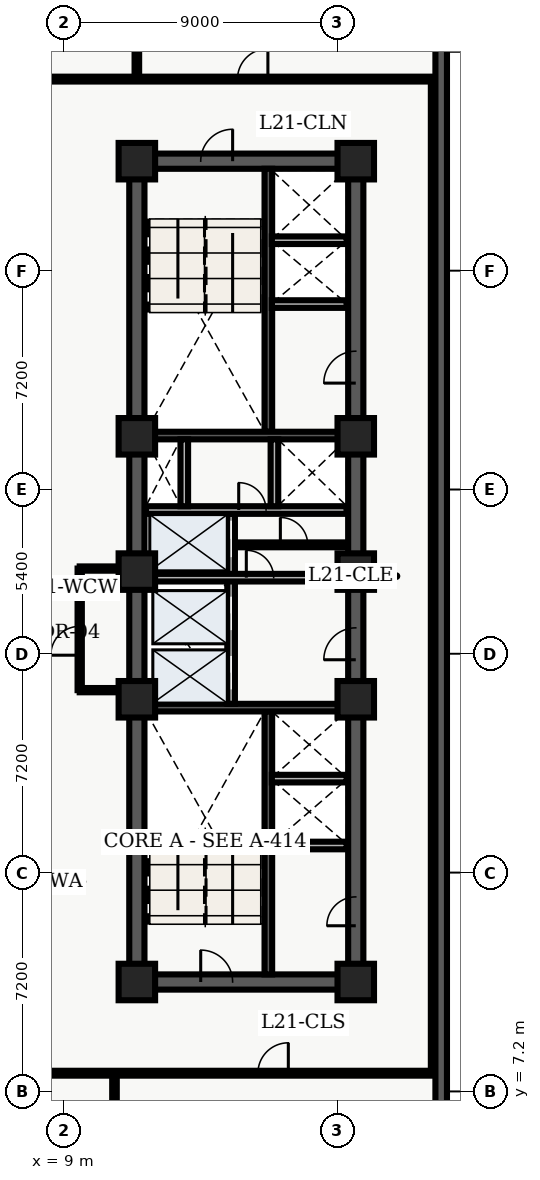
"""IFC4 building model, lengths in metres.
Left out: names, types, materials, properties, quantities, classifications, styles, units other than length and angle.
Written with IfcOpenShell. Run it as: python <this file> out.ifc"""

import sys

from ifc_helpers import new_model, entity, si_unit, converted_unit, direction, frame, origin_with_axes, origin_2d_with_axis, place, context, subcontext, project, spatial, polyline, rectangle, outline, extrude, element, fill, save


model = new_model("IFC4")
c1 = context("Model", 3, precision=1e-05, world=origin_with_axes(), true_north=direction((0.0, 1.0)))
c2 = subcontext(c1, "Body", "Model", "MODEL_VIEW")
j1 = project(units=[si_unit("LENGTHUNIT", "METRE"), converted_unit("PLANEANGLEUNIT", "DEGREE", entity("IfcPlaneAngleMeasure", 0.017), si_unit("PLANEANGLEUNIT", "RADIAN"), dimensions=[0, 0, 0, 0, 0, 0, 0])], contexts=[c1])
p1 = place(None, origin_with_axes())
s1 = spatial("IfcSite", under=j1, at=p1, CompositionType="ELEMENT")
p2 = place(p1, origin_with_axes())
s2 = spatial("IfcBuilding", under=s1, at=p2, CompositionType="ELEMENT")
p3 = place(p2, frame((0.0, 0.0, 89.1), z_axis=(0.0, 0.0, 1.0), x_axis=(1.0, 0.0, 0.0)))
s3 = spatial("IfcBuildingStorey", under=s2, at=p3, CompositionType="ELEMENT", Elevation=89.1)
p4 = place(p3, frame((11.4, 10.8, 0.0), z_axis=(0.0, 0.0, 1.0), x_axis=(0.0, 1.0, 0.0)))
e1 = element("IfcWall", 1, at=p4, inside=s3, PredefinedType="SHEAR", context=c2, shape_type="SweptSolid", body=[
    extrude(outline(polyline([(0.0, -0.25), (27.0, -0.25), (27.0, 0.25), (0.0, 0.25), (0.0, -0.25)])), origin_with_axes(), (0.0, 0.0, 1.0), 3.66),
])
p5 = place(p3, frame((11.4, 10.8, 0.0), z_axis=(0.0, 0.0, 1.0), x_axis=(1.0, 0.0, 0.0)))
e2 = element("IfcWall", 2, at=p5, inside=s3, PredefinedType="SHEAR", context=c2, shape_type="SweptSolid", body=[
    extrude(outline(polyline([(0.0, -0.25), (7.2, -0.25), (7.2, 0.25), (0.0, 0.25), (0.0, -0.25)])), origin_with_axes(), (0.0, 0.0, 1.0), 3.66),
])
p6 = place(p5, frame((2.625, 0.0, 0.0), z_axis=(0.0, 0.0, 1.0), x_axis=(1.0, 0.0, 0.0)))
e3 = element("IfcOpeningElement", 3, at=p6, cuts=e2, PredefinedType="OPENING", context=c2, shape_type="SweptSolid", body=[
    extrude(rectangle(XDim=1.05, YDim=0.52, at=origin_2d_with_axis()), origin_with_axes(), (0.0, 0.0, 1.0), 2.15),
])
p7 = place(p3, frame((11.4, 37.8, 0.0), z_axis=(0.0, 0.0, 1.0), x_axis=(1.0, 0.0, 0.0)))
e4 = element("IfcWall", 4, at=p7, inside=s3, PredefinedType="SHEAR", context=c2, shape_type="SweptSolid", body=[
    extrude(outline(polyline([(0.0, -0.25), (7.2, -0.25), (7.2, 0.25), (0.0, 0.25), (0.0, -0.25)])), origin_with_axes(), (0.0, 0.0, 1.0), 3.66),
])
p8 = place(p7, frame((2.625, 0.0, 0.0), z_axis=(0.0, 0.0, 1.0), x_axis=(1.0, 0.0, 0.0)))
e5 = element("IfcOpeningElement", 5, at=p8, cuts=e4, PredefinedType="OPENING", context=c2, shape_type="SweptSolid", body=[
    extrude(rectangle(XDim=1.05, YDim=0.52, at=origin_2d_with_axis()), origin_with_axes(), (0.0, 0.0, 1.0), 2.15),
])
p9 = place(p3, frame((18.6, 10.8, 0.0), z_axis=(0.0, 0.0, 1.0), x_axis=(0.0, 1.0, 0.0)))
e6 = element("IfcWall", 6, at=p9, inside=s3, PredefinedType="SHEAR", context=c2, shape_type="SweptSolid", body=[
    extrude(outline(polyline([(0.0, -0.25), (13.5, -0.25), (13.5, 0.25), (0.0, 0.25), (0.0, -0.25)])), origin_with_axes(), (0.0, 0.0, 1.0), 3.66),
])
p10 = place(p9, frame((11.125, 0.0, 0.0), z_axis=(0.0, 0.0, 1.0), x_axis=(1.0, 0.0, 0.0)))
e7 = element("IfcOpeningElement", 7, at=p10, cuts=e6, PredefinedType="OPENING", context=c2, shape_type="SweptSolid", body=[
    extrude(rectangle(XDim=1.05, YDim=0.52, at=origin_2d_with_axis()), origin_with_axes(), (0.0, 0.0, 1.0), 2.15),
])
p11 = place(p9, frame((2.325, 0.0, 0.0), z_axis=(0.0, 0.0, 1.0), x_axis=(1.0, 0.0, 0.0)))
e8 = element("IfcOpeningElement", 8, at=p11, cuts=e6, PredefinedType="OPENING", context=c2, shape_type="SweptSolid", body=[
    extrude(rectangle(XDim=0.95, YDim=0.52, at=origin_2d_with_axis()), origin_with_axes(), (0.0, 0.0, 1.0), 2.15),
])
p12 = place(p3, frame((18.6, 24.3, 0.0), z_axis=(0.0, 0.0, 1.0), x_axis=(0.0, 1.0, 0.0)))
e9 = element("IfcWall", 9, at=p12, inside=s3, PredefinedType="SHEAR", context=c2, shape_type="SweptSolid", body=[
    extrude(outline(polyline([(0.0, -0.25), (13.5, -0.25), (13.5, 0.25), (0.0, 0.25), (0.0, -0.25)])), origin_with_axes(), (0.0, 0.0, 1.0), 3.66),
])
p13 = place(p12, frame((6.725, 0.0, 0.0), z_axis=(0.0, 0.0, 1.0), x_axis=(1.0, 0.0, 0.0)))
e10 = element("IfcOpeningElement", 10, at=p13, cuts=e9, PredefinedType="OPENING", context=c2, shape_type="SweptSolid", body=[
    extrude(rectangle(XDim=1.05, YDim=0.52, at=origin_2d_with_axis()), origin_with_axes(), (0.0, 0.0, 1.0), 2.15),
])
p14 = place(p3, frame((15.725, 11.05, 0.0), z_axis=(0.0, 0.0, 1.0), x_axis=(0.0, 1.0, 0.0)))
e11 = element("IfcWall", 11, at=p14, inside=s3, PredefinedType="SHEAR", context=c2, shape_type="SweptSolid", body=[
    extrude(outline(polyline([(0.0, -0.125), (8.65, -0.125), (8.65, 0.125), (0.0, 0.125), (0.0, -0.125)])), origin_with_axes(), (0.0, 0.0, 1.0), 3.66),
])
p15 = place(p3, frame((11.65, 19.825, 0.0), z_axis=(0.0, 0.0, 1.0), x_axis=(1.0, 0.0, 0.0)))
e12 = element("IfcWall", 12, at=p15, inside=s3, PredefinedType="SHEAR", context=c2, shape_type="SweptSolid", body=[
    extrude(outline(polyline([(0.0, -0.125), (6.7, -0.125), (6.7, 0.125), (0.0, 0.125), (0.0, -0.125)])), origin_with_axes(), (0.0, 0.0, 1.0), 3.66),
])
p16 = place(p3, frame((15.725, 28.9, 0.0), z_axis=(0.0, 0.0, 1.0), x_axis=(0.0, 1.0, 0.0)))
e13 = element("IfcWall", 13, at=p16, inside=s3, PredefinedType="SHEAR", context=c2, shape_type="SweptSolid", body=[
    extrude(outline(polyline([(0.0, -0.125), (8.65, -0.125), (8.65, 0.125), (0.0, 0.125), (0.0, -0.125)])), origin_with_axes(), (0.0, 0.0, 1.0), 3.66),
])
p17 = place(p3, frame((11.65, 28.775, 0.0), z_axis=(0.0, 0.0, 1.0), x_axis=(1.0, 0.0, 0.0)))
e14 = element("IfcWall", 14, at=p17, inside=s3, PredefinedType="SHEAR", context=c2, shape_type="SweptSolid", body=[
    extrude(outline(polyline([(0.0, -0.125), (6.7, -0.125), (6.7, 0.125), (0.0, 0.125), (0.0, -0.125)])), origin_with_axes(), (0.0, 0.0, 1.0), 3.66),
])
p18 = place(p3, frame((14.5, 19.95, 0.0), z_axis=(0.0, 0.0, 1.0), x_axis=(0.0, 1.0, 0.0)))
e15 = element("IfcWall", 15, at=p18, inside=s3, PredefinedType="SOLIDWALL", context=c2, shape_type="SweptSolid", body=[
    extrude(outline(polyline([(0.0, -0.125), (6.25, -0.125), (6.25, 0.125), (0.0, 0.125), (0.0, -0.125)])), origin_with_axes(), (0.0, 0.0, 1.0), 2.7),
])
p19 = place(p18, frame((1.025, 0.0, 0.0), z_axis=(0.0, 0.0, 1.0), x_axis=(1.0, 0.0, 0.0)))
e16 = element("IfcOpeningElement", 16, at=p19, cuts=e15, PredefinedType="OPENING", context=c2, shape_type="SweptSolid", body=[
    extrude(rectangle(XDim=1.1, YDim=0.27, at=origin_2d_with_axis()), origin_with_axes(), (0.0, 0.0, 1.0), 2.15),
])
p20 = place(p18, frame((2.975, 0.0, 0.0), z_axis=(0.0, 0.0, 1.0), x_axis=(1.0, 0.0, 0.0)))
e17 = element("IfcOpeningElement", 17, at=p20, cuts=e15, PredefinedType="OPENING", context=c2, shape_type="SweptSolid", body=[
    extrude(rectangle(XDim=1.1, YDim=0.27, at=origin_2d_with_axis()), origin_with_axes(), (0.0, 0.0, 1.0), 2.15),
])
p21 = place(p18, frame((5.425, 0.0, 0.0), z_axis=(0.0, 0.0, 1.0), x_axis=(1.0, 0.0, 0.0)))
e18 = element("IfcOpeningElement", 18, at=p21, cuts=e15, PredefinedType="OPENING", context=c2, shape_type="SweptSolid", body=[
    extrude(rectangle(XDim=1.2, YDim=0.27, at=origin_2d_with_axis()), origin_with_axes(), (0.0, 0.0, 1.0), 2.15),
])
p22 = place(p3, frame((11.7, 24.1, 0.0), z_axis=(0.0, 0.0, 1.0), x_axis=(1.0, 0.0, 0.0)))
e19 = element("IfcWall", 19, at=p22, inside=s3, PredefinedType="SOLIDWALL", context=c2, shape_type="SweptSolid", body=[
    extrude(outline(polyline([(0.0, -0.125), (6.6, -0.125), (6.6, 0.125), (0.0, 0.125), (0.0, -0.125)])), origin_with_axes(), (0.0, 0.0, 1.0), 2.7),
])
p23 = place(p22, frame((3.75, 0.0, 0.0), z_axis=(0.0, 0.0, 1.0), x_axis=(1.0, 0.0, 0.0)))
e20 = element("IfcOpeningElement", 20, at=p23, cuts=e19, PredefinedType="OPENING", context=c2, shape_type="SweptSolid", body=[
    extrude(rectangle(XDim=0.9, YDim=0.27, at=origin_2d_with_axis()), origin_with_axes(), (0.0, 0.0, 1.0), 2.15),
])
p24 = place(p3, frame((11.7, 26.325, 0.0), z_axis=(0.0, 0.0, 1.0), x_axis=(1.0, 0.0, 0.0)))
e21 = element("IfcWall", 21, at=p24, inside=s3, PredefinedType="SOLIDWALL", context=c2, shape_type="SweptSolid", body=[
    extrude(outline(polyline([(0.0, -0.125), (6.6, -0.125), (6.6, 0.125), (0.0, 0.125), (0.0, -0.125)])), origin_with_axes(), (0.0, 0.0, 1.0), 2.7),
])
p25 = place(p24, frame((3.5, 0.0, 0.0), z_axis=(0.0, 0.0, 1.0), x_axis=(1.0, 0.0, 0.0)))
e22 = element("IfcOpeningElement", 22, at=p25, cuts=e21, PredefinedType="OPENING", context=c2, shape_type="SweptSolid", body=[
    extrude(rectangle(XDim=0.9, YDim=0.27, at=origin_2d_with_axis()), origin_with_axes(), (0.0, 0.0, 1.0), 2.15),
])
for number, where, z_axis, x_axis in (
    (23, (12.96, 26.45, 0.0), (0.0, 0.0, 1.0), (0.0, 1.0, 0.0)),
    (24, (15.925, 26.45, 0.0), (0.0, 0.0, 1.0), (0.0, 1.0, 0.0)),
):
    element("IfcWall", number, at=place(p3, frame(where, z_axis=z_axis, x_axis=x_axis)), inside=s3, PredefinedType="SOLIDWALL", context=c2, shape_type="SweptSolid", body=[
        extrude(outline(polyline([(0.0, -0.125), (2.2, -0.125), (2.2, 0.125), (0.0, 0.125), (0.0, -0.125)])), origin_with_axes(), (0.0, 0.0, 1.0), 2.7),
    ])
for number, where, z_axis, x_axis in (
    (25, (11.4, 10.8, 0.0), (0.0, 0.0, 1.0), (1.0, 0.0, 0.0)),
    (26, (11.4, 20.1, 0.0), (0.0, 0.0, 1.0), (1.0, 0.0, 0.0)),
    (27, (11.4, 24.3, 0.0), (0.0, 0.0, 1.0), (1.0, 0.0, 0.0)),
    (28, (11.4, 28.75, 0.0), (0.0, 0.0, 1.0), (1.0, 0.0, 0.0)),
    (29, (11.4, 37.8, 0.0), (0.0, 0.0, 1.0), (1.0, 0.0, 0.0)),
    (30, (18.6, 10.8, 0.0), (0.0, 0.0, 1.0), (1.0, 0.0, 0.0)),
    (31, (18.6, 20.1, 0.0), (0.0, 0.0, 1.0), (1.0, 0.0, 0.0)),
    (32, (18.6, 24.3, 0.0), (0.0, 0.0, 1.0), (1.0, 0.0, 0.0)),
    (33, (18.6, 28.75, 0.0), (0.0, 0.0, 1.0), (1.0, 0.0, 0.0)),
    (34, (18.6, 37.8, 0.0), (0.0, 0.0, 1.0), (1.0, 0.0, 0.0)),
):
    element("IfcColumn", number, at=place(p3, frame(where, z_axis=z_axis, x_axis=x_axis)), inside=s3, PredefinedType="COLUMN", context=c2, shape_type="SweptSolid", body=[
        extrude(rectangle(XDim=1.2, YDim=1.2, at=origin_2d_with_axis()), origin_with_axes(), (0.0, 0.0, 1.0), 3.9),
    ])
p26 = place(p3, frame((14.62, 25.18, 0.0), z_axis=(0.0, 0.0, 1.0), x_axis=(1.0, 0.0, 0.0)))
e35 = element("IfcWall", 35, at=p26, inside=s3, PredefinedType="PARTITIONING", context=c2, shape_type="SweptSolid", body=[
    extrude(outline(polyline([(0.0, -0.08), (3.68, -0.08), (3.68, 0.08), (0.0, 0.08), (0.0, -0.08)])), origin_with_axes(), (0.0, 0.0, 1.0), 2.7),
])
p27 = place(p26, frame((1.95, 0.0, 0.0), z_axis=(0.0, 0.0, 1.0), x_axis=(1.0, 0.0, 0.0)))
e36 = element("IfcOpeningElement", 36, at=p27, cuts=e35, PredefinedType="OPENING", context=c2, shape_type="SweptSolid", body=[
    extrude(rectangle(XDim=0.9, YDim=0.18, at=origin_2d_with_axis()), origin_with_axes(), (0.0, 0.0, 1.0), 2.15),
])
for number, where, z_axis, x_axis in (
    (37, (15.84, 15.29, 0.0), (0.0, 0.0, 1.0), (1.0, 0.0, 0.0)),
    (38, (15.84, 17.49, 0.0), (0.0, 0.0, 1.0), (1.0, 0.0, 0.0)),
    (39, (15.84, 33.1, 0.0), (0.0, 0.0, 1.0), (1.0, 0.0, 0.0)),
    (40, (15.84, 35.2, 0.0), (0.0, 0.0, 1.0), (1.0, 0.0, 0.0)),
):
    element("IfcWall", number, at=place(p3, frame(where, z_axis=z_axis, x_axis=x_axis)), inside=s3, PredefinedType="SOLIDWALL", context=c2, shape_type="SweptSolid", body=[
        extrude(outline(polyline([(0.0, -0.125), (2.46, -0.125), (2.46, 0.125), (0.0, 0.125), (0.0, -0.125)])), origin_with_axes(), (0.0, 0.0, 1.0), 2.7),
    ])
p28 = place(p3, frame((9.52, 20.4, 0.0), z_axis=(0.0, 0.0, 1.0), x_axis=(0.0, 1.0, 0.0)))
e41 = element("IfcWall", 41, at=p28, inside=s3, PredefinedType="PARTITIONING", context=c2, shape_type="SweptSolid", body=[
    extrude(outline(polyline([(0.0, -0.07), (4.0, -0.07), (4.0, 0.07), (0.0, 0.07), (0.0, -0.07)])), origin_with_axes(), (0.0, 0.0, 1.0), 2.7),
])
p29 = place(p28, frame((1.625, 0.0, 0.0), z_axis=(0.0, 0.0, 1.0), x_axis=(1.0, 0.0, 0.0)))
e42 = element("IfcOpeningElement", 42, at=p29, cuts=e41, PredefinedType="OPENING", context=c2, shape_type="SweptSolid", body=[
    extrude(rectangle(XDim=0.95, YDim=0.16, at=origin_2d_with_axis()), origin_with_axes(), (0.0, 0.0, 1.0), 2.15),
])
for number, where, z_axis, x_axis in (
    (43, (9.52, 20.4, 0.0), (0.0, 0.0, 1.0), (1.0, 0.0, 0.0)),
    (44, (9.52, 24.4, 0.0), (0.0, 0.0, 1.0), (1.0, 0.0, 0.0)),
):
    element("IfcWall", number, at=place(p3, frame(where, z_axis=z_axis, x_axis=x_axis)), inside=s3, PredefinedType="PARTITIONING", context=c2, shape_type="SweptSolid", body=[
        extrude(outline(polyline([(0.0, -0.07), (1.58, -0.07), (1.58, 0.07), (0.0, 0.07), (0.0, -0.07)])), origin_with_axes(), (0.0, 0.0, 1.0), 2.7),
    ])
p30 = place(p3, frame((2.6, 7.8, 0.0), z_axis=(0.0, 0.0, 1.0), x_axis=(1.0, 0.0, 0.0)))
e45 = element("IfcWall", 45, at=p30, inside=s3, PredefinedType="PARTITIONING", context=c2, shape_type="SweptSolid", body=[
    extrude(outline(polyline([(0.0, -0.08), (18.625, -0.08), (18.625, 0.08), (0.0, 0.08), (0.0, -0.08)])), origin_with_axes(), (0.0, 0.0, 1.0), 2.7),
])
p31 = place(p30, frame((3.147, 0.0, 0.0), z_axis=(0.0, 0.0, 1.0), x_axis=(1.0, 0.0, 0.0)))
e46 = element("IfcOpeningElement", 46, at=p31, cuts=e45, PredefinedType="OPENING", context=c2, shape_type="SweptSolid", body=[
    extrude(rectangle(XDim=1.0, YDim=0.18, at=origin_2d_with_axis()), origin_with_axes(), (0.0, 0.0, 1.0), 2.15),
])
p32 = place(p30, frame((13.282, 0.0, 0.0), z_axis=(0.0, 0.0, 1.0), x_axis=(1.0, 0.0, 0.0)))
e47 = element("IfcOpeningElement", 47, at=p32, cuts=e45, PredefinedType="OPENING", context=c2, shape_type="SweptSolid", body=[
    extrude(rectangle(XDim=1.0, YDim=0.18, at=origin_2d_with_axis()), origin_with_axes(), (0.0, 0.0, 1.0), 2.15),
])
p33 = place(p3, frame((2.6, 40.5, 0.0), z_axis=(0.0, 0.0, 1.0), x_axis=(1.0, 0.0, 0.0)))
e48 = element("IfcWall", 48, at=p33, inside=s3, PredefinedType="PARTITIONING", context=c2, shape_type="SweptSolid", body=[
    extrude(outline(polyline([(0.0, -0.08), (18.65, -0.08), (18.65, 0.08), (0.0, 0.08), (0.0, -0.08)])), origin_with_axes(), (0.0, 0.0, 1.0), 2.7),
])
p34 = place(p33, frame((2.745, 0.0, 0.0), z_axis=(0.0, 0.0, 1.0), x_axis=(1.0, 0.0, 0.0)))
e49 = element("IfcOpeningElement", 49, at=p34, cuts=e48, PredefinedType="OPENING", context=c2, shape_type="SweptSolid", body=[
    extrude(rectangle(XDim=1.2, YDim=0.18, at=origin_2d_with_axis()), origin_with_axes(), (0.0, 0.0, 1.0), 2.2),
])
p35 = place(p33, frame((12.61, 0.0, 0.0), z_axis=(0.0, 0.0, 1.0), x_axis=(1.0, 0.0, 0.0)))
e50 = element("IfcOpeningElement", 50, at=p35, cuts=e48, PredefinedType="OPENING", context=c2, shape_type="SweptSolid", body=[
    extrude(rectangle(XDim=1.0, YDim=0.18, at=origin_2d_with_axis()), origin_with_axes(), (0.0, 0.0, 1.0), 2.15),
])
p36 = place(p3, frame((21.15, 7.8, 0.0), z_axis=(0.0, 0.0, 1.0), x_axis=(0.0, 1.0, 0.0)))
e51 = element("IfcWall", 51, at=p36, inside=s3, PredefinedType="PARTITIONING", context=c2, shape_type="SweptSolid", body=[
    extrude(outline(polyline([(0.0, -0.08), (32.7, -0.08), (32.7, 0.08), (0.0, 0.08), (0.0, -0.08)])), origin_with_axes(), (0.0, 0.0, 1.0), 2.7),
])
p37 = place(p3, frame((10.664, 0.36, 0.0), z_axis=(0.0, 0.0, 1.0), x_axis=(0.0, 1.0, 0.0)))
e52 = element("IfcWall", 52, at=p37, inside=s3, PredefinedType="PARTITIONING", context=c2, shape_type="SweptSolid", body=[
    extrude(outline(polyline([(0.0, -0.075), (7.34, -0.075), (7.34, 0.075), (0.0, 0.075), (0.0, -0.075)])), origin_with_axes(), (0.0, 0.0, 1.0), 2.7),
])
p38 = place(p3, frame((11.4, 40.6, 0.0), z_axis=(0.0, 0.0, 1.0), x_axis=(0.0, 1.0, 0.0)))
e53 = element("IfcWall", 53, at=p38, inside=s3, PredefinedType="PARTITIONING", context=c2, shape_type="SweptSolid", body=[
    extrude(outline(polyline([(0.0, -0.075), (7.64, -0.075), (7.64, 0.075), (0.0, 0.075), (0.0, -0.075)])), origin_with_axes(), (0.0, 0.0, 1.0), 2.7),
])
p39 = place(p3, frame((21.41, 45.82, 0.0), z_axis=(0.0, 0.0, 1.0), x_axis=(0.0, -1.0, 0.0)))
e54 = element("IfcWall", 54, at=p39, inside=s3, PredefinedType="SOLIDWALL", context=c2, shape_type="SweptSolid", body=[
    extrude(outline(polyline([(0.0, -0.19), (45.82, -0.19), (45.82, 0.19), (0.0, 0.19), (0.0, -0.19)])), origin_with_axes(), (0.0, 0.0, 1.0), 3.66),
])
p40 = place(p39, frame((3.079, 0.0, 0.45), z_axis=(0.0, 0.0, 1.0), x_axis=(1.0, 0.0, 0.0)))
e55 = element("IfcOpeningElement", 55, at=p40, cuts=e54, PredefinedType="OPENING", context=c2, shape_type="SweptSolid", body=[
    extrude(rectangle(XDim=2.1, YDim=0.4, at=origin_2d_with_axis()), origin_with_axes(), (0.0, 0.0, 1.0), 2.2),
])
p41 = place(p39, frame((42.741, 0.0, 0.45), z_axis=(0.0, 0.0, 1.0), x_axis=(1.0, 0.0, 0.0)))
e56 = element("IfcOpeningElement", 56, at=p41, cuts=e54, PredefinedType="OPENING", context=c2, shape_type="SweptSolid", body=[
    extrude(rectangle(XDim=2.1, YDim=0.4, at=origin_2d_with_axis()), origin_with_axes(), (0.0, 0.0, 1.0), 2.2),
])
p42 = place(p18, frame((1.025, 0.0, 0.0), z_axis=(0.0, 0.0, 1.0), x_axis=(1.0, 0.0, 0.0)))
e57 = element("IfcDoor", 57, at=p42, inside=s3, OperationType="SLIDING_TO_LEFT", PredefinedType="DOOR", context=c2, shape_type="SweptSolid", body=[
    extrude(rectangle(XDim=1.1, YDim=0.09, at=origin_2d_with_axis()), origin_with_axes(), (0.0, 0.0, 1.0), 2.15),
])
fill(e16, e57)
p43 = place(p18, frame((2.975, 0.0, 0.0), z_axis=(0.0, 0.0, 1.0), x_axis=(1.0, 0.0, 0.0)))
e58 = element("IfcDoor", 58, at=p43, inside=s3, OperationType="SLIDING_TO_RIGHT", PredefinedType="DOOR", context=c2, shape_type="SweptSolid", body=[
    extrude(rectangle(XDim=1.1, YDim=0.09, at=origin_2d_with_axis()), origin_with_axes(), (0.0, 0.0, 1.0), 2.15),
])
fill(e17, e58)
p44 = place(p18, frame((5.425, 0.0, 0.0), z_axis=(0.0, 0.0, 1.0), x_axis=(1.0, 0.0, 0.0)))
e59 = element("IfcDoor", 59, at=p44, inside=s3, OperationType="DOUBLE_DOOR_SLIDING", PredefinedType="DOOR", context=c2, shape_type="SweptSolid", body=[
    extrude(rectangle(XDim=1.2, YDim=0.09, at=origin_2d_with_axis()), origin_with_axes(), (0.0, 0.0, 1.0), 2.15),
])
fill(e18, e59)
p45 = place(p5, frame((2.625, 0.0, 0.0), z_axis=(0.0, 0.0, 1.0), x_axis=(1.0, 0.0, 0.0)))
e60 = element("IfcDoor", 60, at=p45, inside=s3, OperationType="SINGLE_SWING_LEFT", PredefinedType="DOOR", context=c2, shape_type="SweptSolid", body=[
    extrude(rectangle(XDim=1.05, YDim=0.09, at=origin_2d_with_axis()), origin_with_axes(), (0.0, 0.0, 1.0), 2.15),
])
fill(e3, e60)
p46 = place(p7, frame((2.625, 0.0, 0.0), z_axis=(0.0, 0.0, 1.0), x_axis=(1.0, 0.0, 0.0)))
e61 = element("IfcDoor", 61, at=p46, inside=s3, OperationType="SINGLE_SWING_RIGHT", PredefinedType="DOOR", context=c2, shape_type="SweptSolid", body=[
    extrude(rectangle(XDim=1.05, YDim=0.09, at=origin_2d_with_axis()), origin_with_axes(), (0.0, 0.0, 1.0), 2.15),
])
fill(e5, e61)
p47 = place(p9, frame((11.125, 0.0, 0.0), z_axis=(0.0, 0.0, 1.0), x_axis=(1.0, 0.0, 0.0)))
e62 = element("IfcDoor", 62, at=p47, inside=s3, OperationType="SINGLE_SWING_LEFT", PredefinedType="DOOR", context=c2, shape_type="SweptSolid", body=[
    extrude(rectangle(XDim=1.05, YDim=0.09, at=origin_2d_with_axis()), origin_with_axes(), (0.0, 0.0, 1.0), 2.15),
])
fill(e7, e62)
p48 = place(p24, frame((3.5, 0.0, 0.0), z_axis=(0.0, 0.0, 1.0), x_axis=(1.0, 0.0, 0.0)))
e63 = element("IfcDoor", 63, at=p48, inside=s3, OperationType="SINGLE_SWING_LEFT", PredefinedType="DOOR", context=c2, shape_type="SweptSolid", body=[
    extrude(rectangle(XDim=0.9, YDim=0.09, at=origin_2d_with_axis()), origin_with_axes(), (0.0, 0.0, 1.0), 2.15),
])
fill(e22, e63)
p49 = place(p22, frame((3.75, 0.0, 0.0), z_axis=(0.0, 0.0, 1.0), x_axis=(1.0, 0.0, 0.0)))
e64 = element("IfcDoor", 64, at=p49, inside=s3, OperationType="SINGLE_SWING_LEFT", PredefinedType="DOOR", context=c2, shape_type="SweptSolid", body=[
    extrude(rectangle(XDim=0.9, YDim=0.09, at=origin_2d_with_axis()), origin_with_axes(), (0.0, 0.0, 1.0), 2.15),
])
fill(e20, e64)
p50 = place(p26, frame((1.95, 0.0, 0.0), z_axis=(0.0, 0.0, 1.0), x_axis=(1.0, 0.0, 0.0)))
e65 = element("IfcDoor", 65, at=p50, inside=s3, OperationType="SINGLE_SWING_LEFT", PredefinedType="DOOR", context=c2, shape_type="SweptSolid", body=[
    extrude(rectangle(XDim=0.9, YDim=0.09, at=origin_2d_with_axis()), origin_with_axes(), (0.0, 0.0, 1.0), 2.15),
])
fill(e36, e65)
p51 = place(p9, frame((2.325, 0.0, 0.0), z_axis=(0.0, 0.0, 1.0), x_axis=(1.0, 0.0, 0.0)))
e66 = element("IfcDoor", 66, at=p51, inside=s3, OperationType="SINGLE_SWING_LEFT", PredefinedType="DOOR", context=c2, shape_type="SweptSolid", body=[
    extrude(rectangle(XDim=0.95, YDim=0.09, at=origin_2d_with_axis()), origin_with_axes(), (0.0, 0.0, 1.0), 2.15),
])
fill(e8, e66)
p52 = place(p12, frame((6.725, 0.0, 0.0), z_axis=(0.0, 0.0, 1.0), x_axis=(1.0, 0.0, 0.0)))
e67 = element("IfcDoor", 67, at=p52, inside=s3, OperationType="SINGLE_SWING_LEFT", PredefinedType="DOOR", context=c2, shape_type="SweptSolid", body=[
    extrude(rectangle(XDim=1.05, YDim=0.09, at=origin_2d_with_axis()), origin_with_axes(), (0.0, 0.0, 1.0), 2.15),
])
fill(e10, e67)
p53 = place(p28, frame((1.625, 0.0, 0.0), z_axis=(0.0, 0.0, 1.0), x_axis=(1.0, 0.0, 0.0)))
e68 = element("IfcDoor", 68, at=p53, inside=s3, OperationType="SINGLE_SWING_LEFT", PredefinedType="DOOR", context=c2, shape_type="SweptSolid", body=[
    extrude(rectangle(XDim=0.95, YDim=0.084, at=origin_2d_with_axis()), origin_with_axes(), (0.0, 0.0, 1.0), 2.15),
])
fill(e42, e68)
p54 = place(p30, frame((13.282, 0.0, 0.0), z_axis=(0.0, 0.0, 1.0), x_axis=(1.0, 0.0, 0.0)))
e69 = element("IfcDoor", 69, at=p54, inside=s3, OperationType="SINGLE_SWING_RIGHT", PredefinedType="DOOR", context=c2, shape_type="SweptSolid", body=[
    extrude(rectangle(XDim=1.0, YDim=0.09, at=origin_2d_with_axis()), origin_with_axes(), (0.0, 0.0, 1.0), 2.15),
])
fill(e47, e69)
p55 = place(p33, frame((12.61, 0.0, 0.0), z_axis=(0.0, 0.0, 1.0), x_axis=(1.0, 0.0, 0.0)))
e70 = element("IfcDoor", 70, at=p55, inside=s3, OperationType="SINGLE_SWING_RIGHT", PredefinedType="DOOR", context=c2, shape_type="SweptSolid", body=[
    extrude(rectangle(XDim=1.0, YDim=0.09, at=origin_2d_with_axis()), origin_with_axes(), (0.0, 0.0, 1.0), 2.15),
])
fill(e50, e70)
save(model, sys.argv[1])
